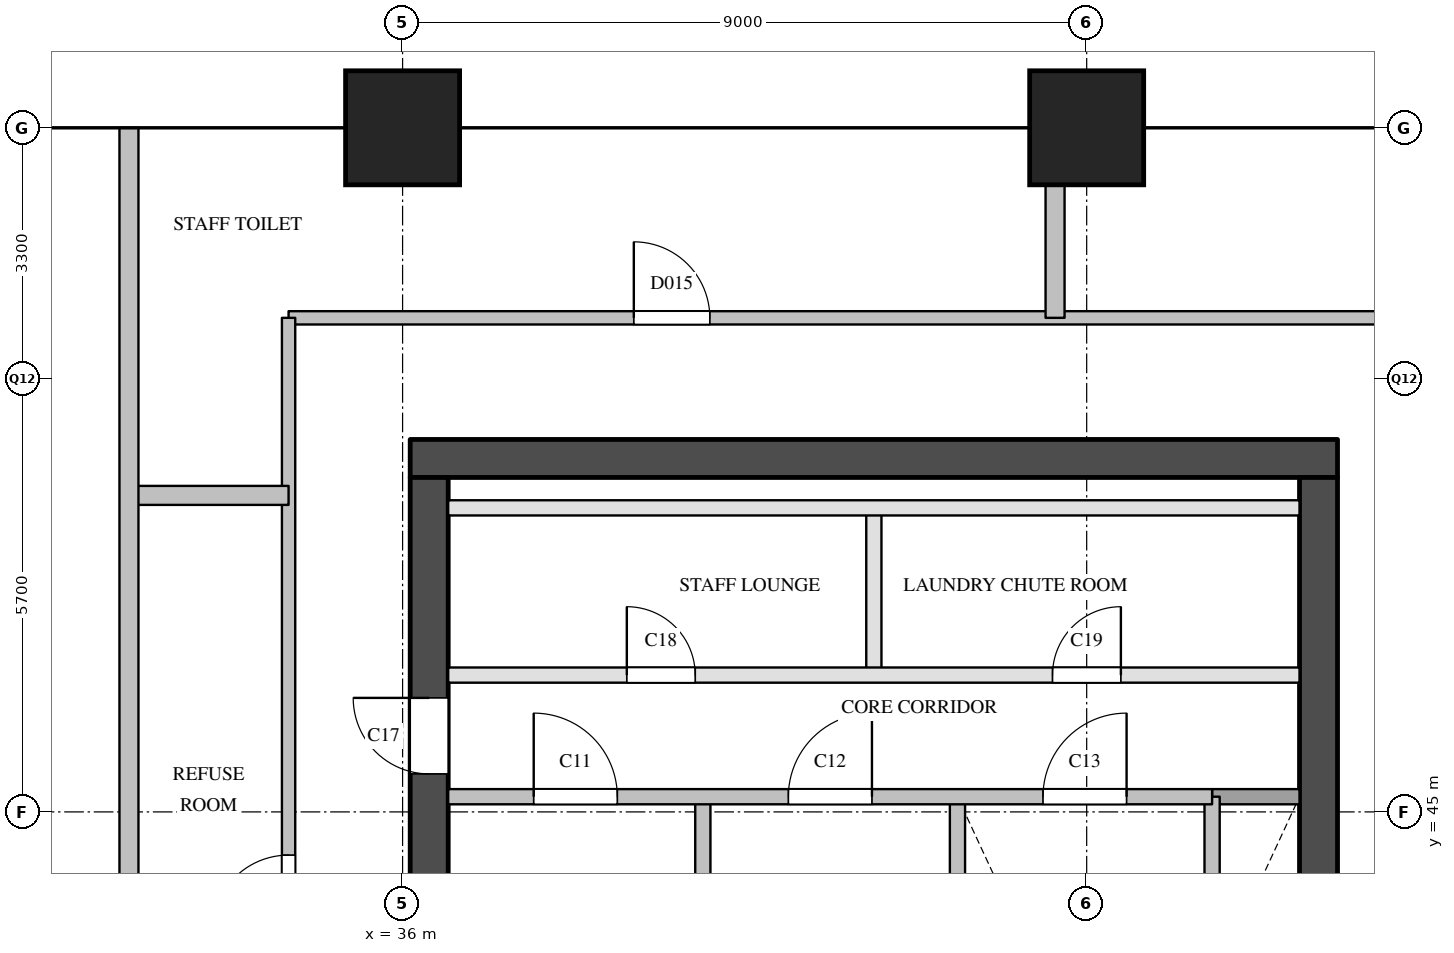
"""IFC4 building model, lengths in metres.
Left out: names, types, materials, properties, quantities, classifications, styles, units other than length and angle.
Written with IfcOpenShell. Run it as: python <this file> out.ifc"""

import sys

from ifc_helpers import new_model, si_unit, direction, frame, frame_2d, origin, origin_2d, place, context, subcontext, project, spatial, rectangle, extrude, element, fill, save


model = new_model("IFC4")
c1 = context("Model", 3, precision=1e-05, world=origin(), true_north=direction((0.0, 1.0)))
c2 = subcontext(c1, "Body", "Model", "MODEL_VIEW")
j1 = project(units=[si_unit("LENGTHUNIT", "METRE"), si_unit("PLANEANGLEUNIT", "RADIAN")], contexts=[c1])
p1 = place(None, origin())
s1 = spatial("IfcSite", under=j1, at=p1, CompositionType="ELEMENT")
p2 = place(p1, origin())
s2 = spatial("IfcBuilding", under=s1, at=p2, CompositionType="ELEMENT")
p3 = place(p2, frame((0.0, 0.0, 189.5)))
s3 = spatial("IfcBuildingStorey", under=s2, at=p3, CompositionType="ELEMENT", Elevation=189.5)
for number, where, z_axis, x_axis in (
    (1, (36.0, 54.0, 0.0), (0.0, 0.0, 1.0), (1.0, 0.0, 0.0)),
    (2, (45.0, 54.0, 0.0), (0.0, 0.0, 1.0), (1.0, 0.0, 0.0)),
):
    element("IfcColumn", number, at=place(p3, frame(where, z_axis=z_axis, x_axis=x_axis)), inside=s3, PredefinedType="COLUMN", context=c2, shape_type="SweptSolid", body=[
        extrude(rectangle(XDim=1.5, YDim=1.5, at=origin_2d()), origin(), (0.0, 0.0, 1.0), 3.9),
    ])
p4 = place(p3, frame((36.1, 49.65, 0.0), z_axis=(0.0, 0.0, 1.0), x_axis=(1.0, 0.0, 0.0)))
e3 = element("IfcWall", 3, at=p4, inside=s3, PredefinedType="SHEAR", context=c2, shape_type="SweptSolid", body=[
    extrude(rectangle(XDim=12.2, YDim=0.5, at=frame_2d((6.1, 0.0))), origin(), (0.0, 0.0, 1.0), 3.6),
])
p5 = place(p3, frame((36.35, 29.1, 0.0), z_axis=(0.0, 0.0, 1.0), x_axis=(0.0, 1.0, 0.0)))
e4 = element("IfcWall", 4, at=p5, inside=s3, PredefinedType="SHEAR", context=c2, shape_type="SweptSolid", body=[
    extrude(rectangle(XDim=20.3, YDim=0.5, at=frame_2d((10.15, 0.0))), origin(), (0.0, 0.0, 1.0), 3.6),
])
p6 = place(p5, frame((3.6, 0.0, 0.0)))
e5 = element("IfcOpeningElement", 5, at=p6, cuts=e4, PredefinedType="OPENING", context=c2, shape_type="SweptSolid", body=[
    extrude(rectangle(XDim=1.8, YDim=2.1, at=frame_2d((0.9, 1.05))), frame((0.0, 0.26, 0.0), z_axis=(0.0, -1.0, 0.0), x_axis=(1.0, 0.0, 0.0)), (0.0, 0.0, 1.0), 0.52),
])
p7 = place(p5, frame((16.4, 0.0, 0.0)))
e6 = element("IfcOpeningElement", 6, at=p7, cuts=e4, PredefinedType="OPENING", context=c2, shape_type="SweptSolid", body=[
    extrude(rectangle(XDim=1.0, YDim=2.1, at=frame_2d((0.5, 1.05))), frame((0.0, 0.26, 0.0), z_axis=(0.0, -1.0, 0.0), x_axis=(1.0, 0.0, 0.0)), (0.0, 0.0, 1.0), 0.52),
])
p8 = place(p3, frame((48.05, 29.1, 0.0), z_axis=(0.0, 0.0, 1.0), x_axis=(0.0, 1.0, 0.0)))
e7 = element("IfcWall", 7, at=p8, inside=s3, PredefinedType="SHEAR", context=c2, shape_type="SweptSolid", body=[
    extrude(rectangle(XDim=20.3, YDim=0.5, at=frame_2d((10.15, 0.0))), origin(), (0.0, 0.0, 1.0), 3.6),
])
p9 = place(p8, frame((12.5, 0.0, 0.0)))
e8 = element("IfcOpeningElement", 8, at=p9, cuts=e7, PredefinedType="OPENING", context=c2, shape_type="SweptSolid", body=[
    extrude(rectangle(XDim=0.7, YDim=2.1, at=frame_2d((0.35, 1.05))), frame((0.0, 0.26, 0.0), z_axis=(0.0, -1.0, 0.0), x_axis=(1.0, 0.0, 0.0)), (0.0, 0.0, 1.0), 0.52),
])
p10 = place(p8, frame((3.9, 0.0, 0.0)))
e9 = element("IfcOpeningElement", 9, at=p10, cuts=e7, PredefinedType="OPENING", context=c2, shape_type="SweptSolid", body=[
    extrude(rectangle(XDim=1.8, YDim=2.1, at=frame_2d((0.9, 1.05))), frame((0.0, 0.26, 0.0), z_axis=(0.0, -1.0, 0.0), x_axis=(1.0, 0.0, 0.0)), (0.0, 0.0, 1.0), 0.52),
])
p11 = place(p3, frame((39.95, 40.78, 0.0), z_axis=(0.0, 0.0, 1.0), x_axis=(0.0, 1.0, 0.0)))
e10 = element("IfcWall", 10, at=p11, inside=s3, PredefinedType="SOLIDWALL", context=c2, shape_type="SweptSolid", body=[
    extrude(rectangle(XDim=4.42, YDim=0.2, at=frame_2d((2.21, 0.0))), origin(), (0.0, 0.0, 1.0), 3.6),
])
p12 = place(p3, frame((42.2, 46.8, 0.0), z_axis=(0.0, 0.0, 1.0), x_axis=(0.0, 1.0, 0.0)))
e11 = element("IfcWall", 11, at=p12, inside=s3, PredefinedType="PARTITIONING", context=c2, shape_type="SweptSolid", body=[
    extrude(rectangle(XDim=2.2, YDim=0.2, at=frame_2d((1.1, 0.0))), origin(), (0.0, 0.0, 1.0), 3.6),
])
for number, where, z_axis, x_axis in (
    (12, (43.3, 40.78, 0.0), (0.0, 0.0, 1.0), (0.0, 1.0, 0.0)),
    (13, (46.65, 40.78, 0.0), (0.0, 0.0, 1.0), (0.0, 1.0, 0.0)),
):
    element("IfcWall", number, at=place(p3, frame(where, z_axis=z_axis, x_axis=x_axis)), inside=s3, PredefinedType="SOLIDWALL", context=c2, shape_type="SweptSolid", body=[
        extrude(rectangle(XDim=4.42, YDim=0.2, at=frame_2d((2.21, 0.0))), origin(), (0.0, 0.0, 1.0), 3.6),
    ])
p13 = place(p3, frame((46.65, 45.2, 0.0), z_axis=(0.0, 0.0, 1.0), x_axis=(1.0, 0.0, 0.0)))
e14 = element("IfcWall", 14, at=p13, inside=s3, PredefinedType="SOLIDWALL", context=c2, shape_type="SweptSolid", body=[
    extrude(rectangle(XDim=1.15, YDim=0.2, at=frame_2d((0.575, 0.0))), origin(), (0.0, 0.0, 1.0), 3.6),
])
p14 = place(p3, frame((36.6, 45.2, 0.0), z_axis=(0.0, 0.0, 1.0), x_axis=(1.0, 0.0, 0.0)))
e15 = element("IfcWall", 15, at=p14, inside=s3, PredefinedType="SOLIDWALL", context=c2, shape_type="SweptSolid", body=[
    extrude(rectangle(XDim=10.05, YDim=0.2, at=frame_2d((5.025, 0.0))), origin(), (0.0, 0.0, 1.0), 3.6),
])
p15 = place(p14, frame((1.125, 0.0, 0.0)))
e16 = element("IfcOpeningElement", 16, at=p15, cuts=e15, PredefinedType="OPENING", context=c2, shape_type="SweptSolid", body=[
    extrude(rectangle(XDim=1.1, YDim=2.1, at=frame_2d((0.55, 1.05))), frame((0.0, 0.11, 0.0), z_axis=(0.0, -1.0, 0.0), x_axis=(1.0, 0.0, 0.0)), (0.0, 0.0, 1.0), 0.22),
])
p16 = place(p14, frame((4.475, 0.0, 0.0)))
e17 = element("IfcOpeningElement", 17, at=p16, cuts=e15, PredefinedType="OPENING", context=c2, shape_type="SweptSolid", body=[
    extrude(rectangle(XDim=1.1, YDim=2.1, at=frame_2d((0.55, 1.05))), frame((0.0, 0.11, 0.0), z_axis=(0.0, -1.0, 0.0), x_axis=(1.0, 0.0, 0.0)), (0.0, 0.0, 1.0), 0.22),
])
p17 = place(p14, frame((7.825, 0.0, 0.0)))
e18 = element("IfcOpeningElement", 18, at=p17, cuts=e15, PredefinedType="OPENING", context=c2, shape_type="SweptSolid", body=[
    extrude(rectangle(XDim=1.1, YDim=2.1, at=frame_2d((0.55, 1.05))), frame((0.0, 0.11, 0.0), z_axis=(0.0, -1.0, 0.0), x_axis=(1.0, 0.0, 0.0)), (0.0, 0.0, 1.0), 0.22),
])
p18 = place(p3, frame((36.6, 46.8, 0.0), z_axis=(0.0, 0.0, 1.0), x_axis=(1.0, 0.0, 0.0)))
e19 = element("IfcWall", 19, at=p18, inside=s3, PredefinedType="PARTITIONING", context=c2, shape_type="SweptSolid", body=[
    extrude(rectangle(XDim=11.2, YDim=0.2, at=frame_2d((5.6, 0.0))), origin(), (0.0, 0.0, 1.0), 3.6),
])
p19 = place(p18, frame((2.35, 0.0, 0.0)))
e20 = element("IfcOpeningElement", 20, at=p19, cuts=e19, PredefinedType="OPENING", context=c2, shape_type="SweptSolid", body=[
    extrude(rectangle(XDim=0.9, YDim=2.1, at=frame_2d((0.45, 1.05))), frame((0.0, 0.11, 0.0), z_axis=(0.0, -1.0, 0.0), x_axis=(1.0, 0.0, 0.0)), (0.0, 0.0, 1.0), 0.22),
])
p20 = place(p18, frame((7.95, 0.0, 0.0)))
e21 = element("IfcOpeningElement", 21, at=p20, cuts=e19, PredefinedType="OPENING", context=c2, shape_type="SweptSolid", body=[
    extrude(rectangle(XDim=0.9, YDim=2.1, at=frame_2d((0.45, 1.05))), frame((0.0, 0.11, 0.0), z_axis=(0.0, -1.0, 0.0), x_axis=(1.0, 0.0, 0.0)), (0.0, 0.0, 1.0), 0.22),
])
p21 = place(p3, frame((36.6, 49.0, 0.0), z_axis=(0.0, 0.0, 1.0), x_axis=(1.0, 0.0, 0.0)))
e22 = element("IfcWall", 22, at=p21, inside=s3, PredefinedType="PARTITIONING", context=c2, shape_type="SweptSolid", body=[
    extrude(rectangle(XDim=11.2, YDim=0.2, at=frame_2d((5.6, 0.0))), origin(), (0.0, 0.0, 1.0), 3.6),
])
p22 = place(p3, frame((34.5, 51.5, 0.0), z_axis=(0.0, 0.0, 1.0), x_axis=(1.0, 0.0, 0.0)))
e23 = element("IfcWall", 23, at=p22, inside=s3, PredefinedType="PARTITIONING", context=c2, shape_type="SweptSolid", body=[
    extrude(rectangle(XDim=15.4, YDim=0.175, at=frame_2d((7.7, 0.0))), origin(), (0.0, 0.0, 1.0), 3.6),
])
p23 = place(p22, frame((4.542, 0.0, 0.0)))
e24 = element("IfcOpeningElement", 24, at=p23, cuts=e23, PredefinedType="OPENING", context=c2, shape_type="SweptSolid", body=[
    extrude(rectangle(XDim=1.0, YDim=2.1, at=frame_2d((0.5, 1.05))), frame((0.0, 0.097, 0.0), z_axis=(0.0, -1.0, 0.0), x_axis=(1.0, 0.0, 0.0)), (0.0, 0.0, 1.0), 0.195),
])
p24 = place(p3, frame((34.5, 38.7, 0.0), z_axis=(0.0, 0.0, 1.0), x_axis=(0.0, 1.0, 0.0)))
e25 = element("IfcWall", 25, at=p24, inside=s3, PredefinedType="PARTITIONING", context=c2, shape_type="SweptSolid", body=[
    extrude(rectangle(XDim=12.8, YDim=0.175, at=frame_2d((6.4, 0.0))), origin(), (0.0, 0.0, 1.0), 3.6),
])
p25 = place(p24, frame((4.732, 0.0, 0.0)))
e26 = element("IfcOpeningElement", 26, at=p25, cuts=e25, PredefinedType="OPENING", context=c2, shape_type="SweptSolid", body=[
    extrude(rectangle(XDim=1.0, YDim=2.1, at=frame_2d((0.5, 1.05))), frame((0.0, 0.097, 0.0), z_axis=(0.0, -1.0, 0.0), x_axis=(1.0, 0.0, 0.0)), (0.0, 0.0, 1.0), 0.195),
])
p26 = place(p3, frame((32.4, 49.164, 0.0), z_axis=(0.0, 0.0, 1.0), x_axis=(1.0, 0.0, 0.0)))
e27 = element("IfcWall", 27, at=p26, inside=s3, PredefinedType="PARTITIONING", context=c2, shape_type="SweptSolid", body=[
    extrude(rectangle(XDim=2.1, YDim=0.25, at=frame_2d((1.05, 0.0))), origin(), (0.0, 0.0, 1.0), 3.6),
])
p27 = place(p3, frame((32.4, 38.7, 0.0), z_axis=(0.0, 0.0, 1.0), x_axis=(0.0, 1.0, 0.0)))
e28 = element("IfcWall", 28, at=p27, inside=s3, PredefinedType="PARTITIONING", context=c2, shape_type="SweptSolid", body=[
    extrude(rectangle(XDim=15.3, YDim=0.25, at=frame_2d((7.65, 0.0))), origin(), (0.0, 0.0, 1.0), 2.6),
])
p28 = place(p3, frame((44.584, 51.5, 0.0), z_axis=(0.0, 0.0, 1.0), x_axis=(0.0, 1.0, 0.0)))
e29 = element("IfcWall", 29, at=p28, inside=s3, PredefinedType="PARTITIONING", context=c2, shape_type="SweptSolid", body=[
    extrude(rectangle(XDim=2.5, YDim=0.25, at=frame_2d((1.25, 0.0))), origin(), (0.0, 0.0, 1.0), 3.6),
])
p29 = place(p15, origin())
e30 = element("IfcDoor", 30, at=p29, inside=s3, OperationType="SINGLE_SWING_LEFT", PredefinedType="DOOR", context=c2, shape_type="SweptSolid", body=[
    extrude(rectangle(XDim=1.1, YDim=2.1, at=frame_2d((0.55, 1.05))), frame((0.0, 0.025, 0.0), z_axis=(0.0, -1.0, 0.0), x_axis=(1.0, 0.0, 0.0)), (0.0, 0.0, 1.0), 0.05),
])
fill(e16, e30)
p30 = place(p16, origin())
e31 = element("IfcDoor", 31, at=p30, inside=s3, OperationType="SINGLE_SWING_RIGHT", PredefinedType="DOOR", context=c2, shape_type="SweptSolid", body=[
    extrude(rectangle(XDim=1.1, YDim=2.1, at=frame_2d((0.55, 1.05))), frame((0.0, 0.025, 0.0), z_axis=(0.0, -1.0, 0.0), x_axis=(1.0, 0.0, 0.0)), (0.0, 0.0, 1.0), 0.05),
])
fill(e17, e31)
p31 = place(p17, origin())
e32 = element("IfcDoor", 32, at=p31, inside=s3, OperationType="SINGLE_SWING_RIGHT", PredefinedType="DOOR", context=c2, shape_type="SweptSolid", body=[
    extrude(rectangle(XDim=1.1, YDim=2.1, at=frame_2d((0.55, 1.05))), frame((0.0, 0.025, 0.0), z_axis=(0.0, -1.0, 0.0), x_axis=(1.0, 0.0, 0.0)), (0.0, 0.0, 1.0), 0.05),
])
fill(e18, e32)
p32 = place(p7, origin())
e33 = element("IfcDoor", 33, at=p32, inside=s3, OperationType="SINGLE_SWING_RIGHT", PredefinedType="DOOR", context=c2, shape_type="SweptSolid", body=[
    extrude(rectangle(XDim=1.0, YDim=2.1, at=frame_2d((0.5, 1.05))), frame((0.0, 0.025, 0.0), z_axis=(0.0, -1.0, 0.0), x_axis=(1.0, 0.0, 0.0)), (0.0, 0.0, 1.0), 0.05),
])
fill(e6, e33)
p33 = place(p19, origin())
e34 = element("IfcDoor", 34, at=p33, inside=s3, OperationType="SINGLE_SWING_LEFT", PredefinedType="DOOR", context=c2, shape_type="SweptSolid", body=[
    extrude(rectangle(XDim=0.9, YDim=2.1, at=frame_2d((0.45, 1.05))), frame((0.0, 0.025, 0.0), z_axis=(0.0, -1.0, 0.0), x_axis=(1.0, 0.0, 0.0)), (0.0, 0.0, 1.0), 0.05),
])
fill(e20, e34)
p34 = place(p20, origin())
e35 = element("IfcDoor", 35, at=p34, inside=s3, OperationType="SINGLE_SWING_RIGHT", PredefinedType="DOOR", context=c2, shape_type="SweptSolid", body=[
    extrude(rectangle(XDim=0.9, YDim=2.1, at=frame_2d((0.45, 1.05))), frame((0.0, 0.025, 0.0), z_axis=(0.0, -1.0, 0.0), x_axis=(1.0, 0.0, 0.0)), (0.0, 0.0, 1.0), 0.05),
])
fill(e21, e35)
p35 = place(p25, origin())
e36 = element("IfcDoor", 36, at=p35, inside=s3, OperationType="SINGLE_SWING_LEFT", PredefinedType="DOOR", context=c2, shape_type="SweptSolid", body=[
    extrude(rectangle(XDim=1.0, YDim=2.1, at=frame_2d((0.5, 1.05))), frame((0.0, 0.025, 0.0), z_axis=(0.0, -1.0, 0.0), x_axis=(1.0, 0.0, 0.0)), (0.0, 0.0, 1.0), 0.05),
])
fill(e26, e36)
p36 = place(p23, origin())
e37 = element("IfcDoor", 37, at=p36, inside=s3, OperationType="SINGLE_SWING_LEFT", PredefinedType="DOOR", context=c2, shape_type="SweptSolid", body=[
    extrude(rectangle(XDim=1.0, YDim=2.1, at=frame_2d((0.5, 1.05))), frame((0.0, 0.025, 0.0), z_axis=(0.0, -1.0, 0.0), x_axis=(1.0, 0.0, 0.0)), (0.0, 0.0, 1.0), 0.05),
])
fill(e24, e37)
save(model, sys.argv[1])
